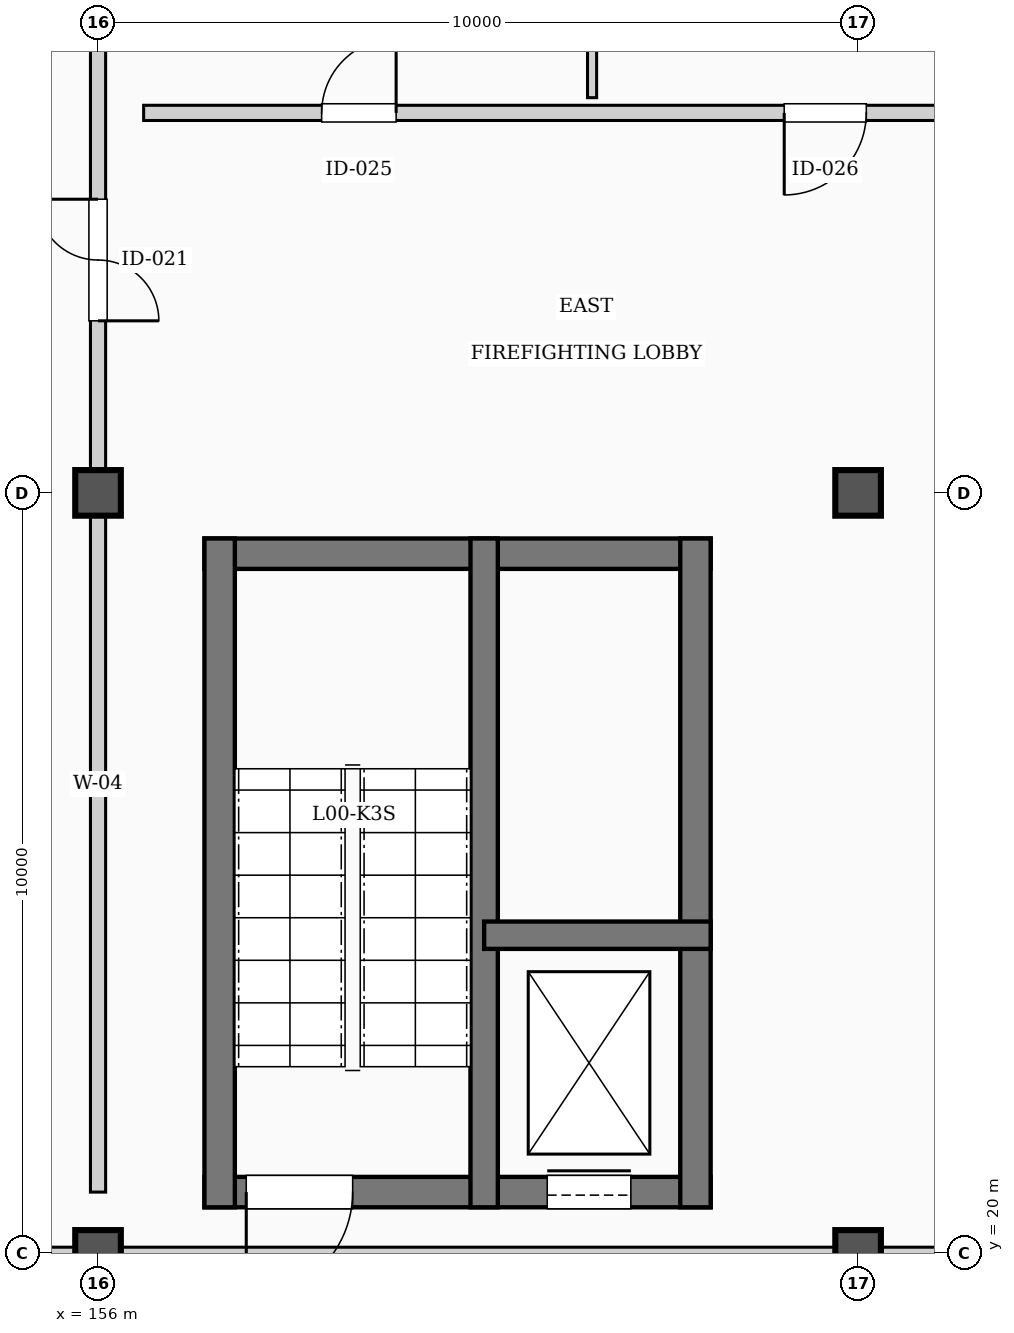
"""IFC4 building model, lengths in metres.
Left out: names, types, materials, properties, quantities, classifications, styles, units other than length and angle.
Written with IfcOpenShell. Run it as: python <this file> out.ifc"""

import sys

from ifc_helpers import new_model, si_unit, direction, frame, frame_2d, origin, origin_2d, place, context, subcontext, project, spatial, rectangle, extrude, element, fill, save


model = new_model("IFC4")
c1 = context("Model", 3, precision=1e-05, world=origin(), true_north=direction((0.0, 1.0)))
c2 = subcontext(c1, "Body", "Model", "MODEL_VIEW")
j1 = project(units=[si_unit("LENGTHUNIT", "METRE"), si_unit("PLANEANGLEUNIT", "RADIAN")], contexts=[c1])
p1 = place(None, origin())
s1 = spatial("IfcSite", under=j1, at=p1, CompositionType="ELEMENT")
p2 = place(p1, origin())
s2 = spatial("IfcBuilding", under=s1, at=p2, CompositionType="ELEMENT")
p3 = place(p2, origin())
s3 = spatial("IfcBuildingStorey", under=s2, at=p3, CompositionType="ELEMENT", Elevation=0.0)
for number, where, z_axis, x_axis in (
    (1, (156.0, 20.0, 0.0), (0.0, 0.0, 1.0), (1.0, 0.0, 0.0)),
    (2, (156.0, 30.0, 0.0), (0.0, 0.0, 1.0), (1.0, 0.0, 0.0)),
    (3, (166.0, 20.0, 0.0), (0.0, 0.0, 1.0), (1.0, 0.0, 0.0)),
    (4, (166.0, 30.0, 0.0), (0.0, 0.0, 1.0), (1.0, 0.0, 0.0)),
):
    element("IfcColumn", number, at=place(p3, frame(where, z_axis=z_axis, x_axis=x_axis)), inside=s3, PredefinedType="COLUMN", context=c2, shape_type="SweptSolid", body=[
        extrude(rectangle(XDim=0.6, YDim=0.6, at=origin_2d()), origin(), (0.0, 0.0, 1.0), 5.4),
    ])
p4 = place(p3, frame((157.4, 20.8, 0.0), z_axis=(0.0, 0.0, 1.0), x_axis=(1.0, 0.0, 0.0)))
e5 = element("IfcWall", 5, at=p4, inside=s3, PredefinedType="SHEAR", context=c2, shape_type="SweptSolid", body=[
    extrude(rectangle(XDim=6.66, YDim=0.4, at=frame_2d((3.33, 0.0))), origin(), (0.0, 0.0, 1.0), 5.4),
])
p5 = place(p4, frame((0.55, 0.0, 0.0)))
e6 = element("IfcOpeningElement", 6, at=p5, cuts=e5, PredefinedType="OPENING", context=c2, shape_type="SweptSolid", body=[
    extrude(rectangle(XDim=1.4, YDim=2.35, at=frame_2d((0.7, 1.175))), frame((0.0, 0.21, 0.0), z_axis=(0.0, -1.0, 0.0), x_axis=(1.0, 0.0, 0.0)), (0.0, 0.0, 1.0), 0.42),
])
p6 = place(p4, frame((4.51, 0.0, 0.0)))
e7 = element("IfcOpeningElement", 7, at=p6, cuts=e5, PredefinedType="OPENING", context=c2, shape_type="SweptSolid", body=[
    extrude(rectangle(XDim=1.1, YDim=2.3, at=frame_2d((0.55, 1.15))), frame((0.0, 0.21, 0.0), z_axis=(0.0, -1.0, 0.0), x_axis=(1.0, 0.0, 0.0)), (0.0, 0.0, 1.0), 0.42),
])
p7 = place(p3, frame((157.4, 29.2, 0.0), z_axis=(0.0, 0.0, 1.0), x_axis=(1.0, 0.0, 0.0)))
e8 = element("IfcWall", 8, at=p7, inside=s3, PredefinedType="SHEAR", context=c2, shape_type="SweptSolid", body=[
    extrude(rectangle(XDim=6.66, YDim=0.4, at=frame_2d((3.33, 0.0))), origin(), (0.0, 0.0, 1.0), 5.4),
])
for number, where, z_axis, x_axis in (
    (9, (157.6, 20.6, 0.0), (0.0, 0.0, 1.0), (0.0, 1.0, 0.0)),
    (10, (163.86, 20.6, 0.0), (0.0, 0.0, 1.0), (0.0, 1.0, 0.0)),
):
    element("IfcWall", number, at=place(p3, frame(where, z_axis=z_axis, x_axis=x_axis)), inside=s3, PredefinedType="SHEAR", context=c2, shape_type="SweptSolid", body=[
        extrude(rectangle(XDim=8.8, YDim=0.4, at=frame_2d((4.4, 0.0))), origin(), (0.0, 0.0, 1.0), 5.4),
    ])
p8 = place(p3, frame((161.08, 20.6, 0.0), z_axis=(0.0, 0.0, 1.0), x_axis=(0.0, 1.0, 0.0)))
e11 = element("IfcWall", 11, at=p8, inside=s3, PredefinedType="SHEAR", context=c2, shape_type="SweptSolid", body=[
    extrude(rectangle(XDim=8.8, YDim=0.36, at=frame_2d((4.4, 0.0))), origin(), (0.0, 0.0, 1.0), 5.4),
])
p9 = place(p3, frame((161.08, 24.18, 0.0), z_axis=(0.0, 0.0, 1.0), x_axis=(1.0, 0.0, 0.0)))
e12 = element("IfcWall", 12, at=p9, inside=s3, PredefinedType="SHEAR", context=c2, shape_type="SweptSolid", body=[
    extrude(rectangle(XDim=2.98, YDim=0.36, at=frame_2d((1.49, 0.0))), origin(), (0.0, 0.0, 1.0), 5.4),
])
p10 = place(p3, frame((156.0, 20.8, 0.0), z_axis=(0.0, 0.0, 1.0), x_axis=(0.0, 1.0, 0.0)))
e13 = element("IfcWall", 13, at=p10, inside=s3, PredefinedType="PARTITIONING", context=c2, shape_type="SweptSolid", body=[
    extrude(rectangle(XDim=58.4, YDim=0.2, at=frame_2d((29.2, 0.0))), origin(), (0.0, 0.0, 1.0), 4.49),
])
p11 = place(p10, frame((11.464, 0.0, 0.0)))
e14 = element("IfcOpeningElement", 14, at=p11, cuts=e13, PredefinedType="OPENING", context=c2, shape_type="SweptSolid", body=[
    extrude(rectangle(XDim=1.6, YDim=2.4, at=frame_2d((0.8, 1.2))), frame((0.0, 0.11, 0.0), z_axis=(0.0, -1.0, 0.0), x_axis=(1.0, 0.0, 0.0)), (0.0, 0.0, 1.0), 0.22),
])
p12 = place(p10, frame((23.428, 0.0, 0.0)))
e15 = element("IfcOpeningElement", 15, at=p12, cuts=e13, PredefinedType="OPENING", context=c2, shape_type="SweptSolid", body=[
    extrude(rectangle(XDim=2.2, YDim=2.5, at=frame_2d((1.1, 1.25))), frame((0.0, 0.11, 0.0), z_axis=(0.0, -1.0, 0.0), x_axis=(1.0, 0.0, 0.0)), (0.0, 0.0, 1.0), 0.22),
])
p13 = place(p10, frame((44.552, 0.0, 0.0)))
e16 = element("IfcOpeningElement", 16, at=p13, cuts=e13, PredefinedType="OPENING", context=c2, shape_type="SweptSolid", body=[
    extrude(rectangle(XDim=2.0, YDim=2.45, at=frame_2d((1.0, 1.225))), frame((0.0, 0.11, 0.0), z_axis=(0.0, -1.0, 0.0), x_axis=(1.0, 0.0, 0.0)), (0.0, 0.0, 1.0), 0.22),
])
p14 = place(p3, frame((146.8, 20.0, 0.0), z_axis=(0.0, 0.0, 1.0), x_axis=(1.0, 0.0, 0.0)))
e17 = element("IfcWall", 17, at=p14, inside=s3, PredefinedType="PARTITIONING", context=c2, shape_type="SweptSolid", body=[
    extrude(rectangle(XDim=28.4, YDim=0.15, at=frame_2d((14.2, 0.0))), origin(), (0.0, 0.0, 1.0), 4.54),
])
p15 = place(p14, frame((3.912, 0.0, 0.0)))
e18 = element("IfcOpeningElement", 18, at=p15, cuts=e17, PredefinedType="OPENING", context=c2, shape_type="SweptSolid", body=[
    extrude(rectangle(XDim=2.4, YDim=2.6, at=frame_2d((1.2, 1.3))), frame((0.0, 0.085, 0.0), z_axis=(0.0, -1.0, 0.0), x_axis=(1.0, 0.0, 0.0)), (0.0, 0.0, 1.0), 0.17),
])
p16 = place(p3, frame((156.6, 35.0, 0.0), z_axis=(0.0, 0.0, 1.0), x_axis=(1.0, 0.0, 0.0)))
e19 = element("IfcWall", 19, at=p16, inside=s3, PredefinedType="PARTITIONING", context=c2, shape_type="SweptSolid", body=[
    extrude(rectangle(XDim=11.8, YDim=0.2, at=frame_2d((5.9, 0.0))), origin(), (0.0, 0.0, 1.0), 5.06),
])
p17 = place(p16, frame((2.342, 0.0, 0.0)))
e20 = element("IfcOpeningElement", 20, at=p17, cuts=e19, PredefinedType="OPENING", context=c2, shape_type="SweptSolid", body=[
    extrude(rectangle(XDim=0.98, YDim=2.3, at=frame_2d((0.49, 1.15))), frame((0.0, 0.11, 0.0), z_axis=(0.0, -1.0, 0.0), x_axis=(1.0, 0.0, 0.0)), (0.0, 0.0, 1.0), 0.22),
])
p18 = place(p16, frame((8.428, 0.0, 0.0)))
e21 = element("IfcOpeningElement", 21, at=p18, cuts=e19, PredefinedType="OPENING", context=c2, shape_type="SweptSolid", body=[
    extrude(rectangle(XDim=1.08, YDim=2.35, at=frame_2d((0.54, 1.175))), frame((0.0, 0.11, 0.0), z_axis=(0.0, -1.0, 0.0), x_axis=(1.0, 0.0, 0.0)), (0.0, 0.0, 1.0), 0.22),
])
p19 = place(p3, frame((162.5, 35.2, 0.0), z_axis=(0.0, 0.0, 1.0), x_axis=(0.0, 1.0, 0.0)))
e22 = element("IfcWall", 22, at=p19, inside=s3, PredefinedType="PARTITIONING", context=c2, shape_type="SweptSolid", body=[
    extrude(rectangle(XDim=4.6, YDim=0.12, at=frame_2d((2.3, 0.0))), origin(), (0.0, 0.0, 1.0), 5.06),
])
p20 = place(p5, origin())
e23 = element("IfcDoor", 23, at=p20, inside=s3, OperationType="SINGLE_SWING_LEFT", PredefinedType="DOOR", context=c2, shape_type="SweptSolid", body=[
    extrude(rectangle(XDim=1.4, YDim=2.35, at=frame_2d((0.7, 1.175))), frame((0.0, 0.025, 0.0), z_axis=(0.0, -1.0, 0.0), x_axis=(1.0, 0.0, 0.0)), (0.0, 0.0, 1.0), 0.05),
])
fill(e6, e23)
p21 = place(p6, origin())
e24 = element("IfcDoor", 24, at=p21, inside=s3, OperationType="SLIDING_TO_LEFT", PredefinedType="DOOR", context=c2, shape_type="SweptSolid", body=[
    extrude(rectangle(XDim=1.1, YDim=2.3, at=frame_2d((0.55, 1.15))), frame((0.0, 0.025, 0.0), z_axis=(0.0, -1.0, 0.0), x_axis=(1.0, 0.0, 0.0)), (0.0, 0.0, 1.0), 0.05),
])
fill(e7, e24)
p22 = place(p11, origin())
e25 = element("IfcDoor", 25, at=p22, inside=s3, OperationType="DOUBLE_DOOR_SINGLE_SWING", PredefinedType="DOOR", context=c2, shape_type="SweptSolid", body=[
    extrude(rectangle(XDim=1.6, YDim=2.4, at=frame_2d((0.8, 1.2))), frame((0.0, 0.025, 0.0), z_axis=(0.0, -1.0, 0.0), x_axis=(1.0, 0.0, 0.0)), (0.0, 0.0, 1.0), 0.05),
])
fill(e14, e25)
p23 = place(p17, origin())
e26 = element("IfcDoor", 26, at=p23, inside=s3, OperationType="SINGLE_SWING_RIGHT", PredefinedType="DOOR", context=c2, shape_type="SweptSolid", body=[
    extrude(rectangle(XDim=0.98, YDim=2.3, at=frame_2d((0.49, 1.15))), frame((0.0, 0.025, 0.0), z_axis=(0.0, -1.0, 0.0), x_axis=(1.0, 0.0, 0.0)), (0.0, 0.0, 1.0), 0.05),
])
fill(e20, e26)
p24 = place(p18, origin())
e27 = element("IfcDoor", 27, at=p24, inside=s3, OperationType="SINGLE_SWING_LEFT", PredefinedType="DOOR", context=c2, shape_type="SweptSolid", body=[
    extrude(rectangle(XDim=1.08, YDim=2.35, at=frame_2d((0.54, 1.175))), frame((0.0, 0.025, 0.0), z_axis=(0.0, -1.0, 0.0), x_axis=(1.0, 0.0, 0.0)), (0.0, 0.0, 1.0), 0.05),
])
fill(e21, e27)
save(model, sys.argv[1])
